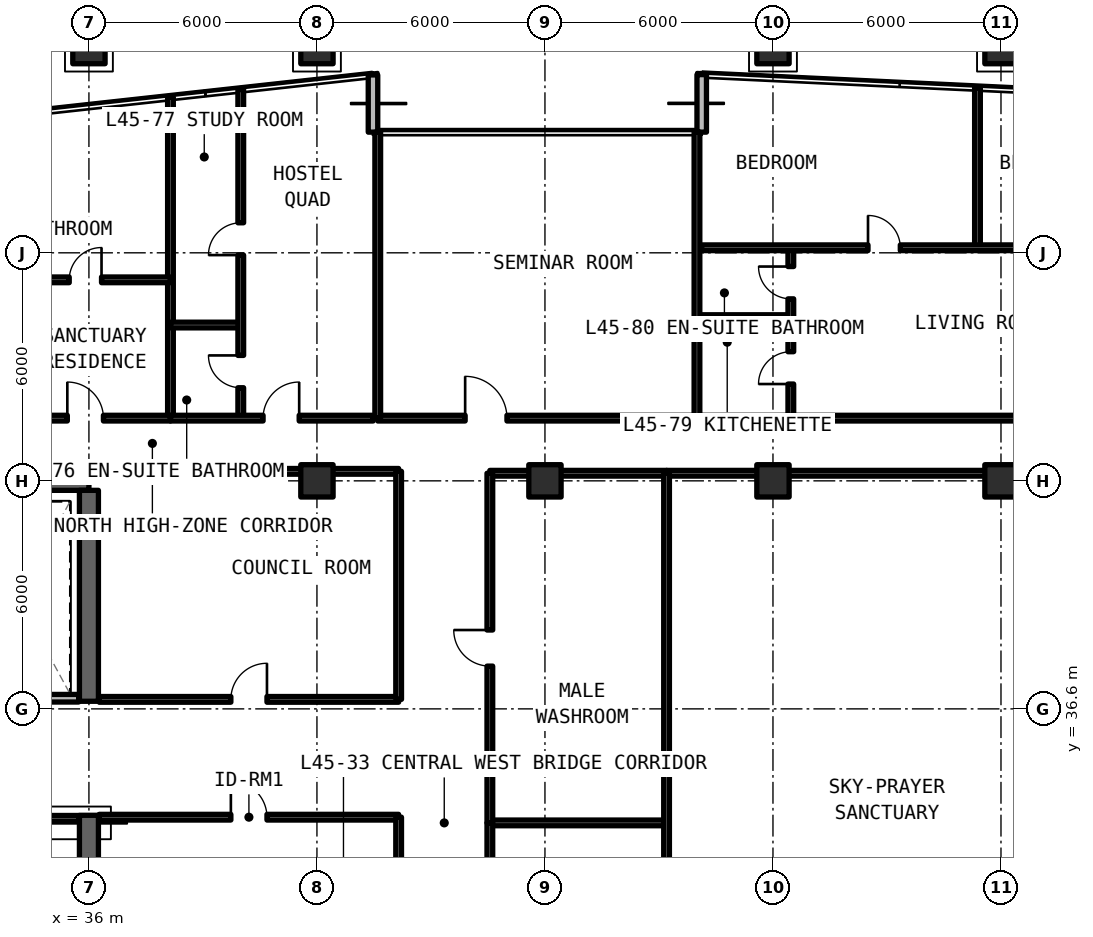
"""IFC4 building model, lengths in metres.
Left out: names, types, materials, properties, quantities, classifications, styles, units other than length and angle.
Written with IfcOpenShell. Run it as: python <this file> out.ifc"""

import sys

from ifc_helpers import new_model, si_unit, direction, frame, frame_2d, origin, origin_2d, place, context, subcontext, project, spatial, rectangle, extrude, element, fill, save


model = new_model("IFC4")
c1 = context("Model", 3, precision=1e-05, world=origin(), true_north=direction((0.0, 1.0)))
c2 = subcontext(c1, "Body", "Model", "MODEL_VIEW")
j1 = project(units=[si_unit("LENGTHUNIT", "METRE"), si_unit("PLANEANGLEUNIT", "RADIAN")], contexts=[c1])
p1 = place(None, origin())
s1 = spatial("IfcSite", under=j1, at=p1, CompositionType="ELEMENT")
p2 = place(p1, origin())
s2 = spatial("IfcBuilding", under=s1, at=p2, CompositionType="ELEMENT")
p3 = place(p2, frame((0.0, 0.0, 162.03)))
s3 = spatial("IfcBuildingStorey", under=s2, at=p3, CompositionType="ELEMENT", Elevation=162.03)
p4 = place(p3, frame((36.0, 42.6, 0.0), z_axis=(0.0, 0.0, 1.0), x_axis=(-1.0, 0.0, 0.0)))
e1 = element("IfcWall", 1, at=p4, inside=s3, PredefinedType="SHEAR", context=c2, shape_type="SweptSolid", body=[
    extrude(rectangle(XDim=12.0, YDim=0.5, at=frame_2d((6.0, 0.0))), origin(), (0.0, 0.0, 1.0), 3.63),
])
p5 = place(p3, frame((36.0, 24.85, 0.0), z_axis=(0.0, 0.0, 1.0), x_axis=(0.0, 1.0, 0.0)))
e2 = element("IfcWall", 2, at=p5, inside=s3, PredefinedType="SHEAR", context=c2, shape_type="SweptSolid", body=[
    extrude(rectangle(XDim=8.95, YDim=0.5, at=frame_2d((4.475, 0.0))), origin(), (0.0, 0.0, 1.0), 3.63),
])
p6 = place(p3, frame((36.0, 36.8, 0.0), z_axis=(0.0, 0.0, 1.0), x_axis=(0.0, 1.0, 0.0)))
e3 = element("IfcWall", 3, at=p6, inside=s3, PredefinedType="SHEAR", context=c2, shape_type="SweptSolid", body=[
    extrude(rectangle(XDim=5.55, YDim=0.5, at=frame_2d((2.775, 0.0))), origin(), (0.0, 0.0, 1.0), 3.63),
])
for number, where, z_axis, x_axis in (
    (4, (42.0, 42.6, 0.0), (0.0, 0.0, 1.0), (1.0, 0.0, 0.0)),
    (5, (48.0, 42.6, 0.0), (0.0, 0.0, 1.0), (1.0, 0.0, 0.0)),
    (6, (54.0, 42.6, 0.0), (0.0, 0.0, 1.0), (1.0, 0.0, 0.0)),
    (7, (60.0, 42.6, 0.0), (0.0, 0.0, 1.0), (1.0, 0.0, 0.0)),
    (8, (36.0, 54.0, 0.0), (0.0, 0.0, 1.0), (1.0, 0.0, 0.0)),
    (9, (42.0, 54.0, 0.0), (0.0, 0.0, 1.0), (1.0, 0.0, 0.0)),
    (10, (54.0, 54.0, 0.0), (0.0, 0.0, 1.0), (1.0, 0.0, 0.0)),
    (11, (60.0, 54.0, 0.0), (0.0, 0.0, 1.0), (1.0, 0.0, 0.0)),
):
    element("IfcColumn", number, at=place(p3, frame(where, z_axis=z_axis, x_axis=x_axis)), inside=s3, PredefinedType="COLUMN", context=c2, shape_type="SweptSolid", body=[
        extrude(rectangle(XDim=0.85, YDim=0.85, at=origin_2d()), origin(), (0.0, 0.0, 1.0), 3.63),
    ])
p7 = place(p3, frame((52.125, 53.289, 0.0), z_axis=(0.0, 0.0, 1.0), x_axis=(0.0, -1.0, 0.0)))
e12 = element("IfcWall", 12, at=p7, inside=s3, PredefinedType="SOLIDWALL", context=c2, shape_type="SweptSolid", body=[
    extrude(rectangle(XDim=1.514, YDim=0.25, at=frame_2d((0.757, 0.0))), origin(), (0.0, 0.0, 1.0), 3.41),
])
p8 = place(p3, frame((43.475, 51.775, 0.0), z_axis=(0.0, 0.0, 1.0), x_axis=(0.0, 1.0, 0.0)))
e13 = element("IfcWall", 13, at=p8, inside=s3, PredefinedType="SOLIDWALL", context=c2, shape_type="SweptSolid", body=[
    extrude(rectangle(XDim=1.506, YDim=0.25, at=frame_2d((0.753, 0.0))), origin(), (0.0, 0.0, 1.0), 3.41),
])
p9 = place(p3, frame((32.68, 33.72, 0.0), z_axis=(0.0, 0.0, 1.0), x_axis=(1.0, 0.0, 0.0)))
e14 = element("IfcWall", 14, at=p9, inside=s3, PredefinedType="SOLIDWALL", context=c2, shape_type="SweptSolid", body=[
    extrude(rectangle(XDim=3.05, YDim=0.15, at=frame_2d((1.525, 0.0))), origin(), (0.0, 0.0, 1.0), 2.63),
])
p10 = place(p3, frame((32.68, 36.88, 0.0), z_axis=(0.0, 0.0, 1.0), x_axis=(1.0, 0.0, 0.0)))
e15 = element("IfcWall", 15, at=p10, inside=s3, PredefinedType="SOLIDWALL", context=c2, shape_type="SweptSolid", body=[
    extrude(rectangle(XDim=3.05, YDim=0.2, at=frame_2d((1.525, 0.0))), origin(), (0.0, 0.0, 1.0), 2.63),
])
p11 = place(p3, frame((36.27, 33.75, 0.0), z_axis=(0.0, 0.0, 1.0), x_axis=(1.0, 0.0, 0.0)))
e16 = element("IfcWall", 16, at=p11, inside=s3, PredefinedType="SOLIDWALL", context=c2, shape_type="SweptSolid", body=[
    extrude(rectangle(XDim=7.88, YDim=0.15, at=frame_2d((3.94, 0.0))), origin(), (0.0, 0.0, 1.0), 2.63),
])
p12 = place(p11, frame((3.465, 0.0, 0.0)))
e17 = element("IfcOpeningElement", 17, at=p12, cuts=e16, PredefinedType="OPENING", context=c2, shape_type="SweptSolid", body=[
    extrude(rectangle(XDim=0.95, YDim=2.15, at=frame_2d((0.475, 1.075))), frame((0.0, 0.085, 0.0), z_axis=(0.0, -1.0, 0.0), x_axis=(1.0, 0.0, 0.0)), (0.0, 0.0, 1.0), 0.17),
])
p13 = place(p3, frame((44.15, 24.35, 0.0), z_axis=(0.0, 0.0, 1.0), x_axis=(0.0, 1.0, 0.0)))
e18 = element("IfcWall", 18, at=p13, inside=s3, PredefinedType="SOLIDWALL", context=c2, shape_type="SweptSolid", body=[
    extrude(rectangle(XDim=9.4, YDim=0.15, at=frame_2d((4.7, 0.0))), origin(), (0.0, 0.0, 1.0), 2.63),
])
p14 = place(p3, frame((36.27, 36.85, 0.0), z_axis=(0.0, 0.0, 1.0), x_axis=(1.0, 0.0, 0.0)))
e19 = element("IfcWall", 19, at=p14, inside=s3, PredefinedType="SOLIDWALL", context=c2, shape_type="SweptSolid", body=[
    extrude(rectangle(XDim=7.88, YDim=0.15, at=frame_2d((3.94, 0.0))), origin(), (0.0, 0.0, 1.0), 2.63),
])
p15 = place(p14, frame((3.465, 0.0, 0.0)))
e20 = element("IfcOpeningElement", 20, at=p15, cuts=e19, PredefinedType="OPENING", context=c2, shape_type="SweptSolid", body=[
    extrude(rectangle(XDim=0.95, YDim=2.15, at=frame_2d((0.475, 1.075))), frame((0.0, 0.085, 0.0), z_axis=(0.0, -1.0, 0.0), x_axis=(1.0, 0.0, 0.0)), (0.0, 0.0, 1.0), 0.17),
])
p16 = place(p3, frame((36.27, 42.85, 0.0), z_axis=(0.0, 0.0, 1.0), x_axis=(1.0, 0.0, 0.0)))
e21 = element("IfcWall", 21, at=p16, inside=s3, PredefinedType="SOLIDWALL", context=c2, shape_type="SweptSolid", body=[
    extrude(rectangle(XDim=7.88, YDim=0.15, at=frame_2d((3.94, 0.0))), origin(), (0.0, 0.0, 1.0), 2.63),
])
p17 = place(p3, frame((44.15, 36.85, 0.0), z_axis=(0.0, 0.0, 1.0), x_axis=(0.0, 1.0, 0.0)))
e22 = element("IfcWall", 22, at=p17, inside=s3, PredefinedType="SOLIDWALL", context=c2, shape_type="SweptSolid", body=[
    extrude(rectangle(XDim=6.0, YDim=0.15, at=frame_2d((3.0, 0.0))), origin(), (0.0, 0.0, 1.0), 2.63),
])
p18 = place(p3, frame((46.55, 33.6, 0.0), z_axis=(0.0, 0.0, 1.0), x_axis=(1.0, 0.0, 0.0)))
e23 = element("IfcWall", 23, at=p18, inside=s3, PredefinedType="SOLIDWALL", context=c2, shape_type="SweptSolid", body=[
    extrude(rectangle(XDim=4.65, YDim=0.15, at=frame_2d((2.325, 0.0))), origin(), (0.0, 0.0, 1.0), 2.63),
])
p19 = place(p3, frame((46.55, 24.4, 0.0), z_axis=(0.0, 0.0, 1.0), x_axis=(0.0, 1.0, 0.0)))
e24 = element("IfcWall", 24, at=p19, inside=s3, PredefinedType="SOLIDWALL", context=c2, shape_type="SweptSolid", body=[
    extrude(rectangle(XDim=9.2, YDim=0.15, at=frame_2d((4.6, 0.0))), origin(), (0.0, 0.0, 1.0), 2.63),
])
p20 = place(p19, frame((4.125, 0.0, 0.0)))
e25 = element("IfcOpeningElement", 25, at=p20, cuts=e24, PredefinedType="OPENING", context=c2, shape_type="SweptSolid", body=[
    extrude(rectangle(XDim=0.95, YDim=2.15, at=frame_2d((0.475, 1.075))), frame((0.0, 0.085, 0.0), z_axis=(0.0, -1.0, 0.0), x_axis=(1.0, 0.0, 0.0)), (0.0, 0.0, 1.0), 0.17),
])
p21 = place(p3, frame((46.55, 42.8, 0.0), z_axis=(0.0, 0.0, 1.0), x_axis=(1.0, 0.0, 0.0)))
e26 = element("IfcWall", 26, at=p21, inside=s3, PredefinedType="SOLIDWALL", context=c2, shape_type="SweptSolid", body=[
    extrude(rectangle(XDim=4.65, YDim=0.15, at=frame_2d((2.325, 0.0))), origin(), (0.0, 0.0, 1.0), 2.63),
])
p22 = place(p3, frame((46.55, 33.6, 0.0), z_axis=(0.0, 0.0, 1.0), x_axis=(0.0, 1.0, 0.0)))
e27 = element("IfcWall", 27, at=p22, inside=s3, PredefinedType="SOLIDWALL", context=c2, shape_type="SweptSolid", body=[
    extrude(rectangle(XDim=9.2, YDim=0.15, at=frame_2d((4.6, 0.0))), origin(), (0.0, 0.0, 1.0), 2.63),
])
p23 = place(p22, frame((4.125, 0.0, 0.0)))
e28 = element("IfcOpeningElement", 28, at=p23, cuts=e27, PredefinedType="OPENING", context=c2, shape_type="SweptSolid", body=[
    extrude(rectangle(XDim=0.95, YDim=2.15, at=frame_2d((0.475, 1.075))), frame((0.0, 0.085, 0.0), z_axis=(0.0, -1.0, 0.0), x_axis=(1.0, 0.0, 0.0)), (0.0, 0.0, 1.0), 0.17),
])
p24 = place(p3, frame((51.2, 42.8, 0.0), z_axis=(0.0, 0.0, 1.0), x_axis=(1.0, 0.0, 0.0)))
e29 = element("IfcWall", 29, at=p24, inside=s3, PredefinedType="SOLIDWALL", context=c2, shape_type="SweptSolid", body=[
    extrude(rectangle(XDim=11.6, YDim=0.15, at=frame_2d((5.8, 0.0))), origin(), (0.0, 0.0, 1.0), 2.63),
])
p25 = place(p3, frame((51.2, 24.4, 0.0), z_axis=(0.0, 0.0, 1.0), x_axis=(0.0, 1.0, 0.0)))
e30 = element("IfcWall", 30, at=p25, inside=s3, PredefinedType="SOLIDWALL", context=c2, shape_type="SweptSolid", body=[
    extrude(rectangle(XDim=18.4, YDim=0.15, at=frame_2d((9.2, 0.0))), origin(), (0.0, 0.0, 1.0), 2.63),
])
p26 = place(p3, frame((43.6, 44.25, 0.0), z_axis=(0.0, 0.0, 1.0), x_axis=(1.0, 0.0, 0.0)))
e31 = element("IfcWall", 31, at=p26, inside=s3, PredefinedType="SOLIDWALL", context=c2, shape_type="SweptSolid", body=[
    extrude(rectangle(XDim=8.4, YDim=0.15, at=frame_2d((4.2, 0.0))), origin(), (0.0, 0.0, 1.0), 2.63),
])
p27 = place(p26, frame((2.3, 0.0, 0.0)))
e32 = element("IfcOpeningElement", 32, at=p27, cuts=e31, PredefinedType="OPENING", context=c2, shape_type="SweptSolid", body=[
    extrude(rectangle(XDim=1.1, YDim=2.15, at=frame_2d((0.55, 1.075))), frame((0.0, 0.085, 0.0), z_axis=(0.0, -1.0, 0.0), x_axis=(1.0, 0.0, 0.0)), (0.0, 0.0, 1.0), 0.17),
])
for number, where, z_axis, x_axis in (
    (33, (43.6, 44.25, 0.0), (0.0, 0.0, 1.0), (0.0, 1.0, 0.0)),
    (34, (52.0, 44.25, 0.0), (0.0, 0.0, 1.0), (0.0, 1.0, 0.0)),
):
    element("IfcWall", number, at=place(p3, frame(where, z_axis=z_axis, x_axis=x_axis)), inside=s3, PredefinedType="SOLIDWALL", context=c2, shape_type="SweptSolid", body=[
        extrude(rectangle(XDim=7.525, YDim=0.15, at=frame_2d((3.762, 0.0))), origin(), (0.0, 0.0, 1.0), 2.63),
    ])
p28 = place(p3, frame((38.146, 44.25, 0.0), z_axis=(0.0, 0.0, 1.0), x_axis=(0.0, 1.0, 0.0)))
e35 = element("IfcWall", 35, at=p28, inside=s3, PredefinedType="SOLIDWALL", context=c2, shape_type="SweptSolid", body=[
    extrude(rectangle(XDim=8.445, YDim=0.15, at=frame_2d((4.222, 0.0))), origin(), (0.0, 0.0, 1.0), 2.63),
])
p29 = place(p3, frame((31.24, 47.889, 0.0), z_axis=(0.0, 0.0, 1.0), x_axis=(1.0, 0.0, 0.0)))
e36 = element("IfcWall", 36, at=p29, inside=s3, PredefinedType="PARTITIONING", context=c2, shape_type="SweptSolid", body=[
    extrude(rectangle(XDim=6.906, YDim=0.15, at=frame_2d((3.453, 0.0))), origin(), (0.0, 0.0, 1.0), 2.63),
])
p30 = place(p29, frame((4.242, 0.0, 0.0)))
e37 = element("IfcOpeningElement", 37, at=p30, cuts=e36, PredefinedType="OPENING", context=c2, shape_type="SweptSolid", body=[
    extrude(rectangle(XDim=0.85, YDim=2.1, at=frame_2d((0.425, 1.05))), frame((0.0, 0.085, 0.0), z_axis=(0.0, -1.0, 0.0), x_axis=(1.0, 0.0, 0.0)), (0.0, 0.0, 1.0), 0.17),
])
p31 = place(p3, frame((31.24, 44.25, 0.0), z_axis=(0.0, 0.0, 1.0), x_axis=(1.0, 0.0, 0.0)))
e38 = element("IfcWall", 38, at=p31, inside=s3, PredefinedType="SOLIDWALL", context=c2, shape_type="SweptSolid", body=[
    extrude(rectangle(XDim=6.906, YDim=0.15, at=frame_2d((3.453, 0.0))), origin(), (0.0, 0.0, 1.0), 2.63),
])
p32 = place(p31, frame((4.192, 0.0, 0.0)))
e39 = element("IfcOpeningElement", 39, at=p32, cuts=e38, PredefinedType="OPENING", context=c2, shape_type="SweptSolid", body=[
    extrude(rectangle(XDim=0.95, YDim=2.15, at=frame_2d((0.475, 1.075))), frame((0.0, 0.085, 0.0), z_axis=(0.0, -1.0, 0.0), x_axis=(1.0, 0.0, 0.0)), (0.0, 0.0, 1.0), 0.17),
])
p33 = place(p3, frame((38.146, 46.7, 0.0), z_axis=(0.0, 0.0, 1.0), x_axis=(1.0, 0.0, 0.0)))
e40 = element("IfcWall", 40, at=p33, inside=s3, PredefinedType="PARTITIONING", context=c2, shape_type="SweptSolid", body=[
    extrude(rectangle(XDim=1.85, YDim=0.15, at=frame_2d((0.925, 0.0))), origin(), (0.0, 0.0, 1.0), 2.63),
])
p34 = place(p3, frame((39.996, 44.25, 0.0), z_axis=(0.0, 0.0, 1.0), x_axis=(0.0, 1.0, 0.0)))
e41 = element("IfcWall", 41, at=p34, inside=s3, PredefinedType="PARTITIONING", context=c2, shape_type="SweptSolid", body=[
    extrude(rectangle(XDim=8.648, YDim=0.15, at=frame_2d((4.324, 0.0))), origin(), (0.0, 0.0, 1.0), 2.63),
])
p35 = place(p34, frame((0.8, 0.0, 0.0)))
e42 = element("IfcOpeningElement", 42, at=p35, cuts=e41, PredefinedType="OPENING", context=c2, shape_type="SweptSolid", body=[
    extrude(rectangle(XDim=0.85, YDim=2.1, at=frame_2d((0.425, 1.05))), frame((0.0, 0.085, 0.0), z_axis=(0.0, -1.0, 0.0), x_axis=(1.0, 0.0, 0.0)), (0.0, 0.0, 1.0), 0.17),
])
p36 = place(p34, frame((4.29, 0.0, 0.0)))
e43 = element("IfcOpeningElement", 43, at=p36, cuts=e41, PredefinedType="OPENING", context=c2, shape_type="SweptSolid", body=[
    extrude(rectangle(XDim=0.85, YDim=2.1, at=frame_2d((0.425, 1.05))), frame((0.0, 0.085, 0.0), z_axis=(0.0, -1.0, 0.0), x_axis=(1.0, 0.0, 0.0)), (0.0, 0.0, 1.0), 0.17),
])
p37 = place(p3, frame((38.146, 44.25, 0.0), z_axis=(0.0, 0.0, 1.0), x_axis=(1.0, 0.0, 0.0)))
e44 = element("IfcWall", 44, at=p37, inside=s3, PredefinedType="SOLIDWALL", context=c2, shape_type="SweptSolid", body=[
    extrude(rectangle(XDim=5.334, YDim=0.15, at=frame_2d((2.667, 0.0))), origin(), (0.0, 0.0, 1.0), 2.63),
])
p38 = place(p37, frame((2.437, 0.0, 0.0)))
e45 = element("IfcOpeningElement", 45, at=p38, cuts=e44, PredefinedType="OPENING", context=c2, shape_type="SweptSolid", body=[
    extrude(rectangle(XDim=0.95, YDim=2.15, at=frame_2d((0.475, 1.075))), frame((0.0, 0.085, 0.0), z_axis=(0.0, -1.0, 0.0), x_axis=(1.0, 0.0, 0.0)), (0.0, 0.0, 1.0), 0.17),
])
p39 = place(p3, frame((52.12, 46.895, 0.0), z_axis=(0.0, 0.0, 1.0), x_axis=(1.0, 0.0, 0.0)))
e46 = element("IfcWall", 46, at=p39, inside=s3, PredefinedType="PARTITIONING", context=c2, shape_type="SweptSolid", body=[
    extrude(rectangle(XDim=2.35, YDim=0.15, at=frame_2d((1.175, 0.0))), origin(), (0.0, 0.0, 1.0), 2.63),
])
p40 = place(p3, frame((54.47, 44.25, 0.0), z_axis=(0.0, 0.0, 1.0), x_axis=(0.0, 1.0, 0.0)))
e47 = element("IfcWall", 47, at=p40, inside=s3, PredefinedType="PARTITIONING", context=c2, shape_type="SweptSolid", body=[
    extrude(rectangle(XDim=4.483, YDim=0.15, at=frame_2d((2.241, 0.0))), origin(), (0.0, 0.0, 1.0), 2.63),
])
p41 = place(p40, frame((0.897, 0.0, 0.0)))
e48 = element("IfcOpeningElement", 48, at=p41, cuts=e47, PredefinedType="OPENING", context=c2, shape_type="SweptSolid", body=[
    extrude(rectangle(XDim=0.85, YDim=2.1, at=frame_2d((0.425, 1.05))), frame((0.0, 0.085, 0.0), z_axis=(0.0, -1.0, 0.0), x_axis=(1.0, 0.0, 0.0)), (0.0, 0.0, 1.0), 0.17),
])
p42 = place(p40, frame((3.139, 0.0, 0.0)))
e49 = element("IfcOpeningElement", 49, at=p42, cuts=e47, PredefinedType="OPENING", context=c2, shape_type="SweptSolid", body=[
    extrude(rectangle(XDim=0.85, YDim=2.1, at=frame_2d((0.425, 1.05))), frame((0.0, 0.085, 0.0), z_axis=(0.0, -1.0, 0.0), x_axis=(1.0, 0.0, 0.0)), (0.0, 0.0, 1.0), 0.17),
])
p43 = place(p3, frame((59.382, 48.733, 0.0), z_axis=(0.0, 0.0, 1.0), x_axis=(0.0, 1.0, 0.0)))
e50 = element("IfcWall", 50, at=p43, inside=s3, PredefinedType="PARTITIONING", context=c2, shape_type="SweptSolid", body=[
    extrude(rectangle(XDim=4.212, YDim=0.15, at=frame_2d((2.106, 0.0))), origin(), (0.0, 0.0, 1.0), 2.63),
])
p44 = place(p3, frame((52.12, 48.733, 0.0), z_axis=(0.0, 0.0, 1.0), x_axis=(1.0, 0.0, 0.0)))
e51 = element("IfcWall", 51, at=p44, inside=s3, PredefinedType="PARTITIONING", context=c2, shape_type="SweptSolid", body=[
    extrude(rectangle(XDim=13.964, YDim=0.15, at=frame_2d((6.982, 0.0))), origin(), (0.0, 0.0, 1.0), 2.63),
])
p45 = place(p44, frame((4.381, 0.0, 0.0)))
e52 = element("IfcOpeningElement", 52, at=p45, cuts=e51, PredefinedType="OPENING", context=c2, shape_type="SweptSolid", body=[
    extrude(rectangle(XDim=0.85, YDim=2.1, at=frame_2d((0.425, 1.05))), frame((0.0, 0.085, 0.0), z_axis=(0.0, -1.0, 0.0), x_axis=(1.0, 0.0, 0.0)), (0.0, 0.0, 1.0), 0.17),
])
p46 = place(p44, frame((10.188, 0.0, 0.0)))
e53 = element("IfcOpeningElement", 53, at=p46, cuts=e51, PredefinedType="OPENING", context=c2, shape_type="SweptSolid", body=[
    extrude(rectangle(XDim=0.85, YDim=2.1, at=frame_2d((0.425, 1.05))), frame((0.0, 0.085, 0.0), z_axis=(0.0, -1.0, 0.0), x_axis=(1.0, 0.0, 0.0)), (0.0, 0.0, 1.0), 0.17),
])
p47 = place(p3, frame((52.12, 44.25, 0.0), z_axis=(0.0, 0.0, 1.0), x_axis=(1.0, 0.0, 0.0)))
e54 = element("IfcWall", 54, at=p47, inside=s3, PredefinedType="SOLIDWALL", context=c2, shape_type="SweptSolid", body=[
    extrude(rectangle(XDim=13.964, YDim=0.15, at=frame_2d((6.982, 0.0))), origin(), (0.0, 0.0, 1.0), 2.63),
])
p48 = place(p47, frame((8.772, 0.0, 0.0)))
e55 = element("IfcOpeningElement", 55, at=p48, cuts=e54, PredefinedType="OPENING", context=c2, shape_type="SweptSolid", body=[
    extrude(rectangle(XDim=0.95, YDim=2.15, at=frame_2d((0.475, 1.075))), frame((0.0, 0.085, 0.0), z_axis=(0.0, -1.0, 0.0), x_axis=(1.0, 0.0, 0.0)), (0.0, 0.0, 1.0), 0.17),
])
p49 = place(p12, origin())
e56 = element("IfcDoor", 56, at=p49, inside=s3, OperationType="SINGLE_SWING_LEFT", PredefinedType="DOOR", context=c2, shape_type="SweptSolid", body=[
    extrude(rectangle(XDim=0.95, YDim=2.15, at=frame_2d((0.475, 1.075))), frame((0.0, 0.025, 0.0), z_axis=(0.0, -1.0, 0.0), x_axis=(1.0, 0.0, 0.0)), (0.0, 0.0, 1.0), 0.05),
])
fill(e17, e56)
p50 = place(p15, origin())
e57 = element("IfcDoor", 57, at=p50, inside=s3, OperationType="SINGLE_SWING_RIGHT", PredefinedType="DOOR", context=c2, shape_type="SweptSolid", body=[
    extrude(rectangle(XDim=0.95, YDim=2.15, at=frame_2d((0.475, 1.075))), frame((0.0, 0.025, 0.0), z_axis=(0.0, -1.0, 0.0), x_axis=(1.0, 0.0, 0.0)), (0.0, 0.0, 1.0), 0.05),
])
fill(e20, e57)
p51 = place(p23, origin())
e58 = element("IfcDoor", 58, at=p51, inside=s3, OperationType="SINGLE_SWING_RIGHT", PredefinedType="DOOR", context=c2, shape_type="SweptSolid", body=[
    extrude(rectangle(XDim=0.95, YDim=2.15, at=frame_2d((0.475, 1.075))), frame((0.0, 0.025, 0.0), z_axis=(0.0, -1.0, 0.0), x_axis=(1.0, 0.0, 0.0)), (0.0, 0.0, 1.0), 0.05),
])
fill(e28, e58)
p52 = place(p27, origin())
e59 = element("IfcDoor", 59, at=p52, inside=s3, OperationType="SINGLE_SWING_LEFT", PredefinedType="DOOR", context=c2, shape_type="SweptSolid", body=[
    extrude(rectangle(XDim=1.1, YDim=2.15, at=frame_2d((0.55, 1.075))), frame((0.0, 0.025, 0.0), z_axis=(0.0, -1.0, 0.0), x_axis=(1.0, 0.0, 0.0)), (0.0, 0.0, 1.0), 0.05),
])
fill(e32, e59)
p53 = place(p30, origin())
e60 = element("IfcDoor", 60, at=p53, inside=s3, OperationType="SINGLE_SWING_RIGHT", PredefinedType="DOOR", context=c2, shape_type="SweptSolid", body=[
    extrude(rectangle(XDim=0.85, YDim=2.1, at=frame_2d((0.425, 1.05))), frame((0.0, 0.025, 0.0), z_axis=(0.0, -1.0, 0.0), x_axis=(1.0, 0.0, 0.0)), (0.0, 0.0, 1.0), 0.05),
])
fill(e37, e60)
p54 = place(p32, origin())
e61 = element("IfcDoor", 61, at=p54, inside=s3, OperationType="SINGLE_SWING_LEFT", PredefinedType="DOOR", context=c2, shape_type="SweptSolid", body=[
    extrude(rectangle(XDim=0.95, YDim=2.15, at=frame_2d((0.475, 1.075))), frame((0.0, 0.025, 0.0), z_axis=(0.0, -1.0, 0.0), x_axis=(1.0, 0.0, 0.0)), (0.0, 0.0, 1.0), 0.05),
])
fill(e39, e61)
p55 = place(p35, origin())
e62 = element("IfcDoor", 62, at=p55, inside=s3, OperationType="SINGLE_SWING_RIGHT", PredefinedType="DOOR", context=c2, shape_type="SweptSolid", body=[
    extrude(rectangle(XDim=0.85, YDim=2.1, at=frame_2d((0.425, 1.05))), frame((0.0, 0.025, 0.0), z_axis=(0.0, -1.0, 0.0), x_axis=(1.0, 0.0, 0.0)), (0.0, 0.0, 1.0), 0.05),
])
fill(e42, e62)
p56 = place(p36, origin())
e63 = element("IfcDoor", 63, at=p56, inside=s3, OperationType="SINGLE_SWING_LEFT", PredefinedType="DOOR", context=c2, shape_type="SweptSolid", body=[
    extrude(rectangle(XDim=0.85, YDim=2.1, at=frame_2d((0.425, 1.05))), frame((0.0, 0.025, 0.0), z_axis=(0.0, -1.0, 0.0), x_axis=(1.0, 0.0, 0.0)), (0.0, 0.0, 1.0), 0.05),
])
fill(e43, e63)
p57 = place(p38, origin())
e64 = element("IfcDoor", 64, at=p57, inside=s3, OperationType="SINGLE_SWING_RIGHT", PredefinedType="DOOR", context=c2, shape_type="SweptSolid", body=[
    extrude(rectangle(XDim=0.95, YDim=2.15, at=frame_2d((0.475, 1.075))), frame((0.0, 0.025, 0.0), z_axis=(0.0, -1.0, 0.0), x_axis=(1.0, 0.0, 0.0)), (0.0, 0.0, 1.0), 0.05),
])
fill(e45, e64)
p58 = place(p41, origin())
e65 = element("IfcDoor", 65, at=p58, inside=s3, OperationType="SINGLE_SWING_LEFT", PredefinedType="DOOR", context=c2, shape_type="SweptSolid", body=[
    extrude(rectangle(XDim=0.85, YDim=2.1, at=frame_2d((0.425, 1.05))), frame((0.0, 0.025, 0.0), z_axis=(0.0, -1.0, 0.0), x_axis=(1.0, 0.0, 0.0)), (0.0, 0.0, 1.0), 0.05),
])
fill(e48, e65)
p59 = place(p42, origin())
e66 = element("IfcDoor", 66, at=p59, inside=s3, OperationType="SINGLE_SWING_RIGHT", PredefinedType="DOOR", context=c2, shape_type="SweptSolid", body=[
    extrude(rectangle(XDim=0.85, YDim=2.1, at=frame_2d((0.425, 1.05))), frame((0.0, 0.025, 0.0), z_axis=(0.0, -1.0, 0.0), x_axis=(1.0, 0.0, 0.0)), (0.0, 0.0, 1.0), 0.05),
])
fill(e49, e66)
p60 = place(p45, origin())
e67 = element("IfcDoor", 67, at=p60, inside=s3, OperationType="SINGLE_SWING_LEFT", PredefinedType="DOOR", context=c2, shape_type="SweptSolid", body=[
    extrude(rectangle(XDim=0.85, YDim=2.1, at=frame_2d((0.425, 1.05))), frame((0.0, 0.025, 0.0), z_axis=(0.0, -1.0, 0.0), x_axis=(1.0, 0.0, 0.0)), (0.0, 0.0, 1.0), 0.05),
])
fill(e52, e67)
save(model, sys.argv[1])
